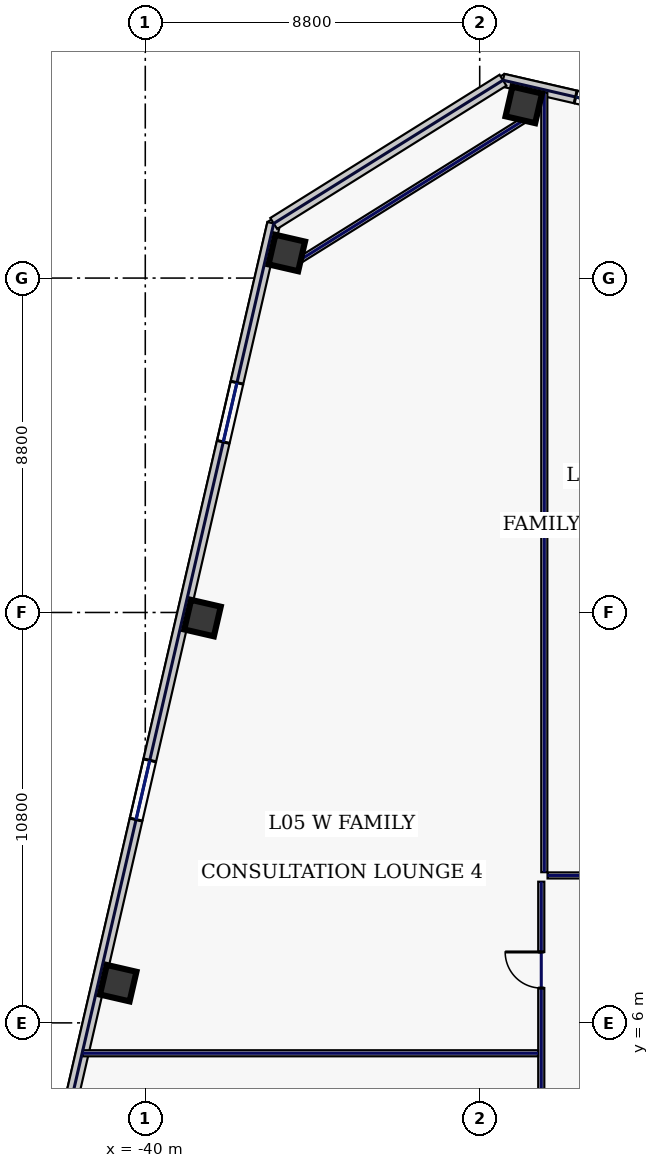
"""IFC4 building model, lengths in metres.
Left out: names, types, materials, properties, quantities, classifications, styles, units other than length and angle.
Written with IfcOpenShell. Run it as: python <this file> out.ifc"""

import sys

from ifc_helpers import new_model, si_unit, direction, frame, frame_2d, origin, origin_2d, place, context, subcontext, project, spatial, rectangle, hollow_rectangle, extrude, element, fill, save


model = new_model("IFC4")
c1 = context("Model", 3, precision=1e-05, world=origin(), true_north=direction((0.0, 1.0)))
c2 = subcontext(c1, "Body", "Model", "MODEL_VIEW")
j1 = project(units=[si_unit("LENGTHUNIT", "METRE"), si_unit("PLANEANGLEUNIT", "RADIAN")], contexts=[c1])
p1 = place(None, origin())
s1 = spatial("IfcSite", under=j1, at=p1, CompositionType="ELEMENT")
p2 = place(p1, origin())
s2 = spatial("IfcBuilding", under=s1, at=p2, CompositionType="ELEMENT")
p3 = place(p2, frame((0.0, 0.0, 28.4)))
s3 = spatial("IfcBuildingStorey", under=s2, at=p3, CompositionType="ELEMENT", Elevation=28.4)
for number, where, z_axis, x_axis in (
    (1, (-30.04, 30.156, 0.0), (0.0, 0.0, 1.0), (0.974, -0.225, 0.0)),
    (2, (-36.276, 26.26, 0.0), (0.0, 0.0, 1.0), (0.974, -0.225, 0.0)),
    (3, (-38.494, 16.652, 0.0), (0.0, 0.0, 1.0), (0.974, -0.225, 0.0)),
    (4, (-40.712, 7.045, 0.0), (0.0, 0.0, 1.0), (0.974, -0.225, 0.0)),
):
    element("IfcColumn", number, at=place(p3, frame(where, z_axis=z_axis, x_axis=x_axis)), inside=s3, PredefinedType="COLUMN", context=c2, shape_type="SweptSolid", body=[
        extrude(hollow_rectangle(XDim=0.8, YDim=0.8, WallThickness=0.036, at=origin_2d()), origin(), (0.0, 0.0, 1.0), 4.68),
    ])
p4 = place(p3, frame((-8.517, 25.711, 0.0), z_axis=(0.0, 0.0, 1.0), x_axis=(-0.974372845456, 0.224939009598, 0.0)))
e5 = element("IfcWall", 5, at=p4, inside=s3, PredefinedType="STANDARD", context=c2, shape_type="SweptSolid", body=[
    extrude(rectangle(XDim=22.652, YDim=0.34, at=frame_2d((11.326, 0.0))), origin(), (0.0, 0.0, 1.0), 4.68),
])
p5 = place(p4, frame((17.989, 0.0, 0.9)))
e6 = element("IfcOpeningElement", 6, at=p5, cuts=e5, PredefinedType="OPENING", context=c2, shape_type="SweptSolid", body=[
    extrude(rectangle(XDim=2.7, YDim=2.2, at=frame_2d((1.35, 1.1))), frame((0.0, 0.18, 0.0), z_axis=(0.0, -1.0, 0.0), x_axis=(1.0, 0.0, 0.0)), (0.0, 0.0, 1.0), 0.36),
])
p6 = place(p4, frame((13.505, 0.0, 0.9)))
e7 = element("IfcOpeningElement", 7, at=p6, cuts=e5, PredefinedType="OPENING", context=c2, shape_type="SweptSolid", body=[
    extrude(rectangle(XDim=0.85, YDim=1.85, at=frame_2d((0.425, 0.925))), frame((0.0, 0.18, 0.0), z_axis=(0.0, -1.0, 0.0), x_axis=(1.0, 0.0, 0.0)), (0.0, 0.0, 1.0), 0.36),
])
p7 = place(p4, frame((8.791, 0.0, 0.22)))
e8 = element("IfcOpeningElement", 8, at=p7, cuts=e5, PredefinedType="OPENING", context=c2, shape_type="SweptSolid", body=[
    extrude(rectangle(XDim=1.6, YDim=1.2, at=frame_2d((0.8, 0.6))), frame((0.0, 0.18, 0.0), z_axis=(0.0, -1.0, 0.0), x_axis=(1.0, 0.0, 0.0)), (0.0, 0.0, 1.0), 0.36),
])
p8 = place(p4, frame((3.756, 0.0, 0.9)))
e9 = element("IfcOpeningElement", 9, at=p8, cuts=e5, PredefinedType="OPENING", context=c2, shape_type="SweptSolid", body=[
    extrude(rectangle(XDim=2.7, YDim=2.2, at=frame_2d((1.35, 1.1))), frame((0.0, 0.18, 0.0), z_axis=(0.0, -1.0, 0.0), x_axis=(1.0, 0.0, 0.0)), (0.0, 0.0, 1.0), 0.36),
])
p9 = place(p3, frame((-36.62, 27.037, 0.0), z_axis=(0.0, 0.0, 1.0), x_axis=(-0.224951280646, -0.974370012539, 0.0)))
e10 = element("IfcWall", 10, at=p9, inside=s3, PredefinedType="STANDARD", context=c2, shape_type="SweptSolid", body=[
    extrude(rectangle(XDim=40.8, YDim=0.34, at=frame_2d((20.4, 0.0))), origin(), (0.0, 0.0, 1.0), 4.68),
])
p10 = place(p9, frame((4.3, 0.0, 0.58)))
e11 = element("IfcOpeningElement", 11, at=p10, cuts=e10, PredefinedType="OPENING", context=c2, shape_type="SweptSolid", body=[
    extrude(rectangle(XDim=1.6, YDim=2.3, at=frame_2d((0.8, 1.15))), frame((0.0, 0.18, 0.0), z_axis=(0.0, -1.0, 0.0), x_axis=(1.0, 0.0, 0.0)), (0.0, 0.0, 1.0), 0.36),
])
p11 = place(p9, frame((14.5, 0.0, 0.58)))
e12 = element("IfcOpeningElement", 12, at=p11, cuts=e10, PredefinedType="OPENING", context=c2, shape_type="SweptSolid", body=[
    extrude(rectangle(XDim=1.6, YDim=2.3, at=frame_2d((0.8, 1.15))), frame((0.0, 0.18, 0.0), z_axis=(0.0, -1.0, 0.0), x_axis=(1.0, 0.0, 0.0)), (0.0, 0.0, 1.0), 0.36),
])
p12 = place(p9, frame((24.7, 0.0, 0.58)))
e13 = element("IfcOpeningElement", 13, at=p12, cuts=e10, PredefinedType="OPENING", context=c2, shape_type="SweptSolid", body=[
    extrude(rectangle(XDim=1.6, YDim=2.3, at=frame_2d((0.8, 1.15))), frame((0.0, 0.18, 0.0), z_axis=(0.0, -1.0, 0.0), x_axis=(1.0, 0.0, 0.0)), (0.0, 0.0, 1.0), 0.36),
])
p13 = place(p9, frame((34.9, 0.0, 0.58)))
e14 = element("IfcOpeningElement", 14, at=p13, cuts=e10, PredefinedType="OPENING", context=c2, shape_type="SweptSolid", body=[
    extrude(rectangle(XDim=1.6, YDim=2.3, at=frame_2d((0.8, 1.15))), frame((0.0, 0.18, 0.0), z_axis=(0.0, -1.0, 0.0), x_axis=(1.0, 0.0, 0.0)), (0.0, 0.0, 1.0), 0.36),
])
p14 = place(p3, frame((-30.588, 30.807, 0.0), z_axis=(0.0, 0.0, 1.0), x_axis=(-0.848031080615, -0.529946493819, 0.0)))
e15 = element("IfcWall", 15, at=p14, inside=s3, PredefinedType="STANDARD", context=c2, shape_type="SweptSolid", body=[
    extrude(rectangle(XDim=7.114, YDim=0.34, at=frame_2d((3.557, 0.0))), origin(), (0.0, 0.0, 1.0), 4.68),
])
p15 = place(p3, frame((-29.86, 29.868, 0.0), z_axis=(0.0, 0.0, 1.0), x_axis=(-0.848043064089, -0.529927317139, 0.0)))
e16 = element("IfcWall", 16, at=p15, inside=s3, PredefinedType="PARTITIONING", context=c2, shape_type="SweptSolid", body=[
    extrude(rectangle(XDim=7.354, YDim=0.16, at=frame_2d((3.677, 0.0))), origin(), (0.0, 0.0, 1.0), 4.68),
])
p16 = place(p3, frame((-29.58, -9.715, 0.0), z_axis=(0.0, 0.0, 1.0), x_axis=(0.0, 1.0, 0.0)))
e17 = element("IfcWall", 17, at=p16, inside=s3, PredefinedType="PARTITIONING", context=c2, shape_type="SweptSolid", body=[
    extrude(rectangle(XDim=19.43, YDim=0.16, at=frame_2d((9.715, 0.0))), origin(), (0.0, 0.0, 1.0), 4.68),
])
p17 = place(p16, frame((2.019, 0.0, 0.0)))
e18 = element("IfcOpeningElement", 18, at=p17, cuts=e17, PredefinedType="OPENING", context=c2, shape_type="SweptSolid", body=[
    extrude(rectangle(XDim=0.95, YDim=2.2, at=frame_2d((0.475, 1.1))), frame((0.0, 0.09, 0.0), z_axis=(0.0, -1.0, 0.0), x_axis=(1.0, 0.0, 0.0)), (0.0, 0.0, 1.0), 0.18),
])
p18 = place(p16, frame((6.725, 0.0, 0.0)))
e19 = element("IfcOpeningElement", 19, at=p18, cuts=e17, PredefinedType="OPENING", context=c2, shape_type="SweptSolid", body=[
    extrude(rectangle(XDim=0.95, YDim=2.2, at=frame_2d((0.475, 1.1))), frame((0.0, 0.09, 0.0), z_axis=(0.0, -1.0, 0.0), x_axis=(1.0, 0.0, 0.0)), (0.0, 0.0, 1.0), 0.18),
])
p19 = place(p16, frame((11.925, 0.0, 0.0)))
e20 = element("IfcOpeningElement", 20, at=p19, cuts=e17, PredefinedType="OPENING", context=c2, shape_type="SweptSolid", body=[
    extrude(rectangle(XDim=0.95, YDim=2.2, at=frame_2d((0.475, 1.1))), frame((0.0, 0.09, 0.0), z_axis=(0.0, -1.0, 0.0), x_axis=(1.0, 0.0, 0.0)), (0.0, 0.0, 1.0), 0.18),
])
p20 = place(p16, frame((16.631, 0.0, 0.0)))
e21 = element("IfcOpeningElement", 21, at=p20, cuts=e17, PredefinedType="OPENING", context=c2, shape_type="SweptSolid", body=[
    extrude(rectangle(XDim=0.95, YDim=2.2, at=frame_2d((0.475, 1.1))), frame((0.0, 0.09, 0.0), z_axis=(0.0, -1.0, 0.0), x_axis=(1.0, 0.0, 0.0)), (0.0, 0.0, 1.0), 0.18),
])
p21 = place(p3, frame((-29.415, 9.88, 0.0), z_axis=(0.0, 0.0, 1.0), x_axis=(1.0, 0.0, 0.0)))
e22 = element("IfcWall", 22, at=p21, inside=s3, PredefinedType="PARTITIONING", context=c2, shape_type="SweptSolid", body=[
    extrude(rectangle(XDim=58.83, YDim=0.16, at=frame_2d((29.415, 0.0))), origin(), (0.0, 0.0, 1.0), 4.68),
])
p22 = place(p21, frame((2.469, 0.0, 0.0)))
e23 = element("IfcOpeningElement", 23, at=p22, cuts=e22, PredefinedType="OPENING", context=c2, shape_type="SweptSolid", body=[
    extrude(rectangle(XDim=0.95, YDim=2.2, at=frame_2d((0.475, 1.1))), frame((0.0, 0.09, 0.0), z_axis=(0.0, -1.0, 0.0), x_axis=(1.0, 0.0, 0.0)), (0.0, 0.0, 1.0), 0.18),
])
p23 = place(p21, frame((7.15, 0.0, 0.0)))
e24 = element("IfcOpeningElement", 24, at=p23, cuts=e22, PredefinedType="OPENING", context=c2, shape_type="SweptSolid", body=[
    extrude(rectangle(XDim=1.3, YDim=2.2, at=frame_2d((0.65, 1.1))), frame((0.0, 0.09, 0.0), z_axis=(0.0, -1.0, 0.0), x_axis=(1.0, 0.0, 0.0)), (0.0, 0.0, 1.0), 0.18),
])
p24 = place(p21, frame((14.325, 0.0, 0.0)))
e25 = element("IfcOpeningElement", 25, at=p24, cuts=e22, PredefinedType="OPENING", context=c2, shape_type="SweptSolid", body=[
    extrude(rectangle(XDim=1.3, YDim=2.2, at=frame_2d((0.65, 1.1))), frame((0.0, 0.09, 0.0), z_axis=(0.0, -1.0, 0.0), x_axis=(1.0, 0.0, 0.0)), (0.0, 0.0, 1.0), 0.18),
])
p25 = place(p21, frame((23.8, 0.0, 0.0)))
e26 = element("IfcOpeningElement", 26, at=p25, cuts=e22, PredefinedType="OPENING", context=c2, shape_type="SweptSolid", body=[
    extrude(rectangle(XDim=1.15, YDim=2.2, at=frame_2d((0.575, 1.1))), frame((0.0, 0.09, 0.0), z_axis=(0.0, -1.0, 0.0), x_axis=(1.0, 0.0, 0.0)), (0.0, 0.0, 1.0), 0.18),
])
p26 = place(p21, frame((33.125, 0.0, 0.0)))
e27 = element("IfcOpeningElement", 27, at=p26, cuts=e22, PredefinedType="OPENING", context=c2, shape_type="SweptSolid", body=[
    extrude(rectangle(XDim=1.3, YDim=2.2, at=frame_2d((0.65, 1.1))), frame((0.0, 0.09, 0.0), z_axis=(0.0, -1.0, 0.0), x_axis=(1.0, 0.0, 0.0)), (0.0, 0.0, 1.0), 0.18),
])
p27 = place(p21, frame((42.825, 0.0, 0.0)))
e28 = element("IfcOpeningElement", 28, at=p27, cuts=e22, PredefinedType="OPENING", context=c2, shape_type="SweptSolid", body=[
    extrude(rectangle(XDim=1.3, YDim=2.2, at=frame_2d((0.65, 1.1))), frame((0.0, 0.09, 0.0), z_axis=(0.0, -1.0, 0.0), x_axis=(1.0, 0.0, 0.0)), (0.0, 0.0, 1.0), 0.18),
])
p28 = place(p21, frame((52.706, 0.0, 0.0)))
e29 = element("IfcOpeningElement", 29, at=p28, cuts=e22, PredefinedType="OPENING", context=c2, shape_type="SweptSolid", body=[
    extrude(rectangle(XDim=1.45, YDim=2.2, at=frame_2d((0.725, 1.1))), frame((0.0, 0.09, 0.0), z_axis=(0.0, -1.0, 0.0), x_axis=(1.0, 0.0, 0.0)), (0.0, 0.0, 1.0), 0.18),
])
p29 = place(p3, frame((-29.5, 9.965, 0.0), z_axis=(0.0, 0.0, 1.0), x_axis=(0.0, 1.0, 0.0)))
e30 = element("IfcWall", 30, at=p29, inside=s3, PredefinedType="PARTITIONING", context=c2, shape_type="SweptSolid", body=[
    extrude(rectangle(XDim=20.519, YDim=0.16, at=frame_2d((10.259, 0.0))), origin(), (0.0, 0.0, 1.0), 4.68),
])
p30 = place(p3, frame((-41.641, 5.2, 0.0), z_axis=(0.0, 0.0, 1.0), x_axis=(1.0, 0.0, 0.0)))
e31 = element("IfcWall", 31, at=p30, inside=s3, PredefinedType="PARTITIONING", context=c2, shape_type="SweptSolid", body=[
    extrude(rectangle(XDim=11.976, YDim=0.16, at=frame_2d((5.988, 0.0))), origin(), (0.0, 0.0, 1.0), 4.68),
])
p31 = place(p5, origin())
e32 = element("IfcWindow", 32, at=p31, inside=s3, PartitioningType="SINGLE_PANEL", PredefinedType="WINDOW", context=c2, shape_type="SweptSolid", body=[
    extrude(rectangle(XDim=2.7, YDim=2.2, at=frame_2d((1.35, 1.1))), frame((0.0, 0.03, 0.0), z_axis=(0.0, -1.0, 0.0), x_axis=(1.0, 0.0, 0.0)), (0.0, 0.0, 1.0), 0.06),
])
fill(e6, e32)
p32 = place(p10, origin())
e33 = element("IfcWindow", 33, at=p32, inside=s3, PartitioningType="SINGLE_PANEL", PredefinedType="WINDOW", context=c2, shape_type="SweptSolid", body=[
    extrude(rectangle(XDim=1.6, YDim=2.3, at=frame_2d((0.8, 1.15))), frame((0.0, 0.03, 0.0), z_axis=(0.0, -1.0, 0.0), x_axis=(1.0, 0.0, 0.0)), (0.0, 0.0, 1.0), 0.06),
])
fill(e11, e33)
p33 = place(p11, origin())
e34 = element("IfcWindow", 34, at=p33, inside=s3, PartitioningType="SINGLE_PANEL", PredefinedType="WINDOW", context=c2, shape_type="SweptSolid", body=[
    extrude(rectangle(XDim=1.6, YDim=2.3, at=frame_2d((0.8, 1.15))), frame((0.0, 0.03, 0.0), z_axis=(0.0, -1.0, 0.0), x_axis=(1.0, 0.0, 0.0)), (0.0, 0.0, 1.0), 0.06),
])
fill(e12, e34)
p34 = place(p20, origin())
e35 = element("IfcDoor", 35, at=p34, inside=s3, OperationType="SINGLE_SWING_RIGHT", PredefinedType="DOOR", context=c2, shape_type="SweptSolid", body=[
    extrude(rectangle(XDim=0.95, YDim=2.2, at=frame_2d((0.475, 1.1))), frame((0.0, 0.025, 0.0), z_axis=(0.0, -1.0, 0.0), x_axis=(1.0, 0.0, 0.0)), (0.0, 0.0, 1.0), 0.05),
])
fill(e21, e35)
save(model, sys.argv[1])
